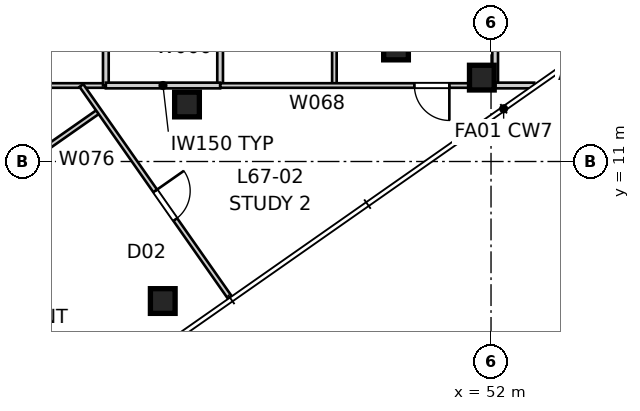
"""IFC4 building model, lengths in metres.
Left out: names, types, materials, properties, quantities, classifications, styles, units other than length and angle.
Written with IfcOpenShell. Run it as: python <this file> out.ifc"""

import sys

from ifc_helpers import new_model, si_unit, direction, frame, frame_2d, origin, origin_2d, place, context, subcontext, project, spatial, rectangle, extrude, element, fill, save


model = new_model("IFC4")
c1 = context("Model", 3, precision=1e-05, world=origin(), true_north=direction((0.0, 1.0)))
c2 = subcontext(c1, "Body", "Model", "MODEL_VIEW")
j1 = project(units=[si_unit("LENGTHUNIT", "METRE"), si_unit("PLANEANGLEUNIT", "RADIAN")], contexts=[c1])
p1 = place(None, origin())
s1 = spatial("IfcSite", under=j1, at=p1, CompositionType="ELEMENT")
p2 = place(p1, origin())
s2 = spatial("IfcBuilding", under=s1, at=p2, CompositionType="ELEMENT")
p3 = place(p2, frame((0.0, 0.0, 243.8)))
s3 = spatial("IfcBuildingStorey", under=s2, at=p3, CompositionType="ELEMENT", Elevation=243.8)
for number, where, z_axis, x_axis in (
    (1, (43.362, 7.328, 0.0), (0.0, 0.0, 1.0), (1.0, 0.0, 0.0)),
    (2, (51.758, 13.207, 0.0), (0.0, 0.0, 1.0), (1.0, 0.0, 0.0)),
    (3, (44.0, 12.5, 0.0), (0.0, 0.0, 1.0), (1.0, 0.0, 0.0)),
    (4, (49.5, 14.0, 0.0), (0.0, 0.0, 1.0), (1.0, 0.0, 0.0)),
):
    element("IfcColumn", number, at=place(p3, frame(where, z_axis=z_axis, x_axis=x_axis)), inside=s3, PredefinedType="COLUMN", context=c2, shape_type="SweptSolid", body=[
        extrude(rectangle(XDim=0.65, YDim=0.65, at=origin_2d()), origin(), (0.0, 0.0, 1.0), 3.4),
    ])
p4 = place(p3, frame((41.865, 13.0, 0.0), z_axis=(0.0, 0.0, 1.0), x_axis=(-1.0, 0.0, 0.0)))
e5 = element("IfcWall", 5, at=p4, inside=s3, PredefinedType="PARTITIONING", context=c2, shape_type="SweptSolid", body=[
    extrude(rectangle(XDim=10.11, YDim=0.12, at=frame_2d((5.055, 0.0))), origin(), (0.0, 0.0, 1.0), 2.55),
])
p5 = place(p3, frame((41.865, 17.9, 0.0), z_axis=(0.0, 0.0, 1.0), x_axis=(0.0, -1.0, 0.0)))
e6 = element("IfcWall", 6, at=p5, inside=s3, PredefinedType="SOLIDWALL", context=c2, shape_type="SweptSolid", body=[
    extrude(rectangle(XDim=4.9, YDim=0.15, at=frame_2d((2.45, 0.0))), origin(), (0.0, 0.0, 1.0), 3.25),
])
p6 = place(p5, frame((1.97, 0.0, 0.0)))
e7 = element("IfcOpeningElement", 7, at=p6, cuts=e6, PredefinedType="OPENING", context=c2, shape_type="SweptSolid", body=[
    extrude(rectangle(XDim=0.96, YDim=2.1, at=frame_2d((0.48, 1.05))), frame((0.0, 0.085, 0.0), z_axis=(0.0, -1.0, 0.0), x_axis=(1.0, 0.0, 0.0)), (0.0, 0.0, 1.0), 0.17),
])
p7 = place(p3, frame((44.871, 13.0, 0.0), z_axis=(0.0, 0.0, 1.0), x_axis=(0.0, 1.0, 0.0)))
e8 = element("IfcWall", 8, at=p7, inside=s3, PredefinedType="SOLIDWALL", context=c2, shape_type="SweptSolid", body=[
    extrude(rectangle(XDim=4.9, YDim=0.15, at=frame_2d((2.45, 0.0))), origin(), (0.0, 0.0, 1.0), 3.25),
])
p8 = place(p7, frame((1.97, 0.0, 0.0)))
e9 = element("IfcOpeningElement", 9, at=p8, cuts=e8, PredefinedType="OPENING", context=c2, shape_type="SweptSolid", body=[
    extrude(rectangle(XDim=0.96, YDim=2.1, at=frame_2d((0.48, 1.05))), frame((0.0, 0.085, 0.0), z_axis=(0.0, -1.0, 0.0), x_axis=(1.0, 0.0, 0.0)), (0.0, 0.0, 1.0), 0.17),
])
p9 = place(p3, frame((47.878, 17.9, 0.0), z_axis=(0.0, 0.0, 1.0), x_axis=(0.0, -1.0, 0.0)))
e10 = element("IfcWall", 10, at=p9, inside=s3, PredefinedType="PARTITIONING", context=c2, shape_type="SweptSolid", body=[
    extrude(rectangle(XDim=4.9, YDim=0.12, at=frame_2d((2.45, 0.0))), origin(), (0.0, 0.0, 1.0), 3.25),
])
p10 = place(p9, frame((1.97, 0.0, 0.0)))
e11 = element("IfcOpeningElement", 11, at=p10, cuts=e10, PredefinedType="OPENING", context=c2, shape_type="SweptSolid", body=[
    extrude(rectangle(XDim=0.96, YDim=2.1, at=frame_2d((0.48, 1.05))), frame((0.0, 0.07, 0.0), z_axis=(0.0, -1.0, 0.0), x_axis=(1.0, 0.0, 0.0)), (0.0, 0.0, 1.0), 0.14),
])
p11 = place(p3, frame((52.109, 13.0, 0.0), z_axis=(0.0, 0.0, 1.0), x_axis=(-1.0, 0.0, 0.0)))
e12 = element("IfcWall", 12, at=p11, inside=s3, PredefinedType="PARTITIONING", context=c2, shape_type="SweptSolid", body=[
    extrude(rectangle(XDim=7.238, YDim=0.12, at=frame_2d((3.619, 0.0))), origin(), (0.0, 0.0, 1.0), 2.55),
])
p12 = place(p11, frame((1.205, 0.0, 0.0)))
e13 = element("IfcOpeningElement", 13, at=p12, cuts=e12, PredefinedType="OPENING", context=c2, shape_type="SweptSolid", body=[
    extrude(rectangle(XDim=0.92, YDim=2.34, at=frame_2d((0.46, 1.17))), frame((0.0, 0.07, 0.0), z_axis=(0.0, -1.0, 0.0), x_axis=(1.0, 0.0, 0.0)), (0.0, 0.0, 1.0), 0.14),
])
p13 = place(p3, frame((44.871, 13.0, 0.0), z_axis=(0.0, 0.0, 1.0), x_axis=(-1.0, 0.0, 0.0)))
e14 = element("IfcWall", 14, at=p13, inside=s3, PredefinedType="SOLIDWALL", context=c2, shape_type="SweptSolid", body=[
    extrude(rectangle(XDim=3.007, YDim=0.15, at=frame_2d((1.503, 0.0))), origin(), (0.0, 0.0, 1.0), 3.25),
])
p14 = place(p3, frame((52.109, 18.194, 0.0), z_axis=(0.0, 0.0, 1.0), x_axis=(0.0, -1.0, 0.0)))
e15 = element("IfcWall", 15, at=p14, inside=s3, PredefinedType="SOLIDWALL", context=c2, shape_type="SweptSolid", body=[
    extrude(rectangle(XDim=5.194, YDim=0.15, at=frame_2d((2.597, 0.0))), origin(), (0.0, 0.0, 1.0), 3.25),
])
p15 = place(p14, frame((2.337, 0.0, 0.0)))
e16 = element("IfcOpeningElement", 16, at=p15, cuts=e15, PredefinedType="OPENING", context=c2, shape_type="SweptSolid", body=[
    extrude(rectangle(XDim=0.92, YDim=2.34, at=frame_2d((0.46, 1.17))), frame((0.0, 0.085, 0.0), z_axis=(0.0, -1.0, 0.0), x_axis=(1.0, 0.0, 0.0)), (0.0, 0.0, 1.0), 0.17),
])
p16 = place(p3, frame((53.136, 13.0, 0.0), z_axis=(0.0, 0.0, 1.0), x_axis=(-1.0, 0.0, 0.0)))
e17 = element("IfcWall", 17, at=p16, inside=s3, PredefinedType="SOLIDWALL", context=c2, shape_type="SweptSolid", body=[
    extrude(rectangle(XDim=1.027, YDim=0.15, at=frame_2d((0.513, 0.0))), origin(), (0.0, 0.0, 1.0), 3.25),
])
p17 = place(p3, frame((31.279, 5.04, 0.0), z_axis=(0.0, 0.0, 1.0), x_axis=(0.819155207289, 0.573571919092, 0.0)))
e18 = element("IfcWall", 18, at=p17, inside=s3, PredefinedType="PARTITIONING", context=c2, shape_type="SweptSolid", body=[
    extrude(rectangle(XDim=12.71, YDim=0.12, at=frame_2d((6.355, 0.0))), origin(), (0.0, 0.0, 1.0), 2.717),
])
p18 = place(p17, frame((5.875, 0.0, 0.0)))
e19 = element("IfcOpeningElement", 19, at=p18, cuts=e18, PredefinedType="OPENING", context=c2, shape_type="SweptSolid", body=[
    extrude(rectangle(XDim=0.92, YDim=2.34, at=frame_2d((0.46, 1.17))), frame((0.0, 0.07, 0.0), z_axis=(0.0, -1.0, 0.0), x_axis=(1.0, 0.0, 0.0)), (0.0, 0.0, 1.0), 0.14),
])
p19 = place(p3, frame((41.222, 13.0, 0.0), z_axis=(0.0, 0.0, 1.0), x_axis=(0.57357503053, -0.819153028653, 0.0)))
e20 = element("IfcWall", 20, at=p19, inside=s3, PredefinedType="PARTITIONING", context=c2, shape_type="SweptSolid", body=[
    extrude(rectangle(XDim=6.834, YDim=0.12, at=frame_2d((3.417, 0.0))), origin(), (0.0, 0.0, 1.0), 3.25),
])
p20 = place(p19, frame((3.386, 0.0, 0.0)))
e21 = element("IfcOpeningElement", 21, at=p20, cuts=e20, PredefinedType="OPENING", context=c2, shape_type="SweptSolid", body=[
    extrude(rectangle(XDim=0.92, YDim=2.34, at=frame_2d((0.46, 1.17))), frame((0.0, 0.07, 0.0), z_axis=(0.0, -1.0, 0.0), x_axis=(1.0, 0.0, 0.0)), (0.0, 0.0, 1.0), 0.14),
])
p21 = place(p12, origin())
e22 = element("IfcDoor", 22, at=p21, inside=s3, OperationType="SINGLE_SWING_LEFT", PredefinedType="DOOR", context=c2, shape_type="SweptSolid", body=[
    extrude(rectangle(XDim=0.92, YDim=2.34, at=frame_2d((0.46, 1.17))), frame((0.0, 0.025, 0.0), z_axis=(0.0, -1.0, 0.0), x_axis=(1.0, 0.0, 0.0)), (0.0, 0.0, 1.0), 0.05),
])
fill(e13, e22)
p22 = place(p20, origin())
e23 = element("IfcDoor", 23, at=p22, inside=s3, OperationType="SINGLE_SWING_LEFT", PredefinedType="DOOR", context=c2, shape_type="SweptSolid", body=[
    extrude(rectangle(XDim=0.92, YDim=2.34, at=frame_2d((0.46, 1.17))), frame((0.0, 0.025, 0.0), z_axis=(0.0, -1.0, 0.0), x_axis=(1.0, 0.0, 0.0)), (0.0, 0.0, 1.0), 0.05),
])
fill(e21, e23)
save(model, sys.argv[1])
